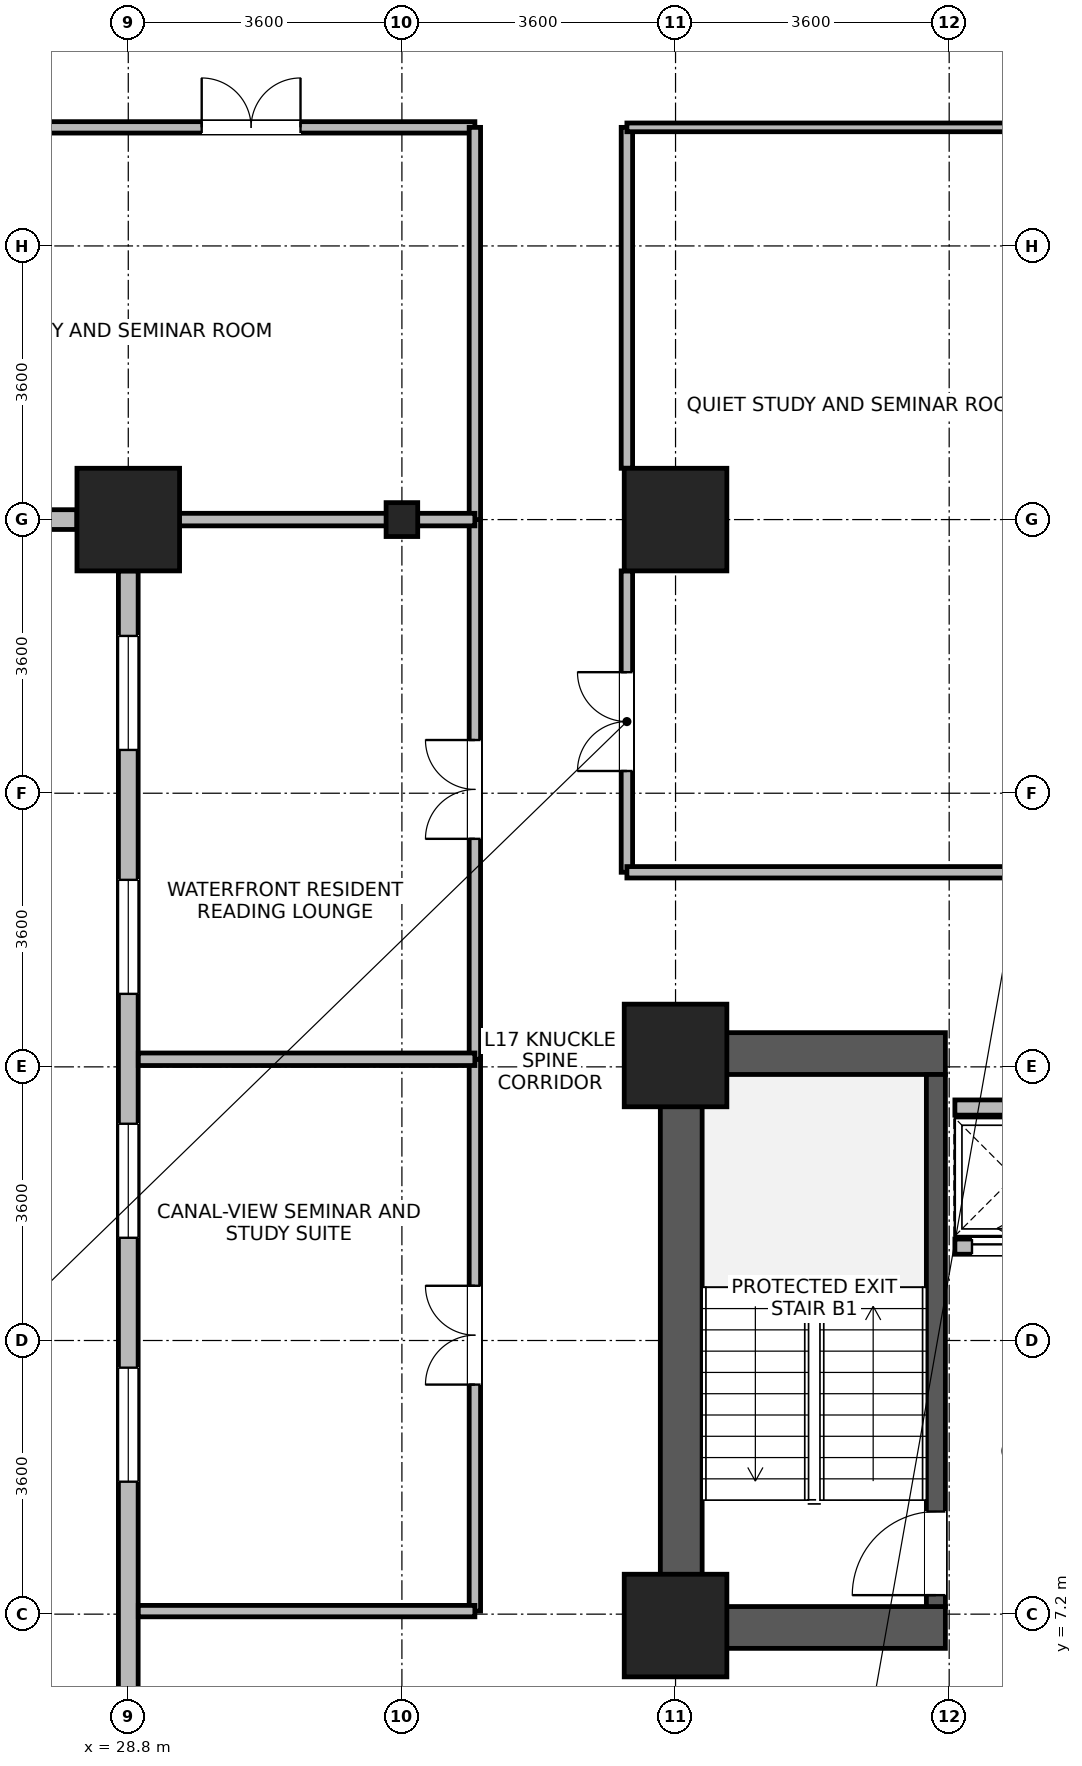
"""IFC4 building model, lengths in metres.
Left out: names, types, materials, properties, quantities, classifications, styles, units other than length and angle.
Written with IfcOpenShell. Run it as: python <this file> out.ifc"""

import sys

from ifc_helpers import new_model, si_unit, direction, frame, frame_2d, origin, origin_2d, place, context, subcontext, project, spatial, rectangle, i_section, extrude, source, transform, mapped, element, fill, save


model = new_model("IFC4")
c1 = context("Model", 3, precision=1e-05, world=origin(), true_north=direction((0.0, 1.0)))
c2 = subcontext(c1, "Body", "Model", "MODEL_VIEW")
j1 = project(units=[si_unit("LENGTHUNIT", "METRE"), si_unit("PLANEANGLEUNIT", "RADIAN")], contexts=[c1])
p1 = place(None, origin())
s1 = spatial("IfcSite", under=j1, at=p1, CompositionType="ELEMENT")
p2 = place(p1, origin())
s2 = spatial("IfcBuilding", under=s1, at=p2, CompositionType="ELEMENT")
p3 = place(p2, frame((0.0, 0.0, 69.7)))
s3 = spatial("IfcBuildingStorey", under=s2, at=p3, CompositionType="ELEMENT", Elevation=69.7)
p4 = place(p3, frame((36.075, 6.75, 0.0), z_axis=(0.0, 0.0, 1.0), x_axis=(0.0, 1.0, 0.0)))
e1 = element("IfcWall", 1, at=p4, inside=s3, PredefinedType="SHEAR", context=c2, shape_type="SweptSolid", body=[
    extrude(rectangle(XDim=8.1, YDim=0.55, at=frame_2d((4.05, 0.0))), origin(), (0.0, 0.0, 1.0), 3.34),
])
for number, where, z_axis, x_axis in (
    (2, (36.35, 7.025, 0.0), (0.0, 0.0, 1.0), (1.0, 0.0, 0.0)),
    (3, (36.35, 14.575, 0.0), (0.0, 0.0, 1.0), (1.0, 0.0, 0.0)),
):
    element("IfcWall", number, at=place(p3, frame(where, z_axis=z_axis, x_axis=x_axis)), inside=s3, PredefinedType="SHEAR", context=c2, shape_type="SweptSolid", body=[
        extrude(rectangle(XDim=3.2, YDim=0.55, at=frame_2d((1.6, 0.0))), origin(), (0.0, 0.0, 1.0), 3.34),
    ])
p5 = place(p3, frame((39.425, 7.3, 0.0), z_axis=(0.0, 0.0, 1.0), x_axis=(0.0, 1.0, 0.0)))
e4 = element("IfcWall", 4, at=p5, inside=s3, PredefinedType="SHEAR", context=c2, shape_type="SweptSolid", body=[
    extrude(rectangle(XDim=7.0, YDim=0.25, at=frame_2d((3.5, 0.0))), origin(), (0.0, 0.0, 1.0), 3.34),
])
p6 = place(p5, frame((0.15, 0.0, 0.0)))
e5 = element("IfcOpeningElement", 5, at=p6, cuts=e4, PredefinedType="OPENING", context=c2, shape_type="SweptSolid", body=[
    extrude(rectangle(XDim=1.1, YDim=2.08, at=frame_2d((0.55, 1.04))), frame((0.0, 0.135, 0.0), z_axis=(0.0, -1.0, 0.0), x_axis=(1.0, 0.0, 0.0)), (0.0, 0.0, 1.0), 0.27),
])
m1 = source(origin(), c2, "Body", "SweptSolid", [
    extrude(rectangle(XDim=1.35, YDim=1.35, at=origin_2d()), origin(), (0.0, 0.0, 1.0), 3.7),
])
for number, where, z_axis, x_axis in (
    (6, (28.8, 21.6, 0.0), (0.0, 0.0, 1.0), (1.0, 0.0, 0.0)),
    (7, (36.0, 21.6, 0.0), (0.0, 0.0, 1.0), (1.0, 0.0, 0.0)),
    (8, (36.0, 7.05, 0.0), (0.0, 0.0, 1.0), (1.0, 0.0, 0.0)),
    (9, (36.0, 14.55, 0.0), (0.0, 0.0, 1.0), (1.0, 0.0, 0.0)),
):
    element("IfcColumn", number, at=place(p3, frame(where, z_axis=z_axis, x_axis=x_axis)), inside=s3, PredefinedType="COLUMN", context=c2, shape_type="MappedRepresentation", body=[
        mapped(m1, transform((0.0, 0.0, 0.0), x_axis=(1.0, 0.0, 0.0), y_axis=(0.0, 1.0, 0.0), z_axis=(0.0, 0.0, 1.0), scale=1.0)),
    ])
m2 = source(origin(), c2, "Body", "SweptSolid", [
    extrude(i_section(OverallWidth=0.416, OverallDepth=0.446, WebThickness=0.029, FlangeThickness=0.04, FilletRadius=0.015, at=origin_2d()), origin(), (0.0, 0.0, 1.0), 3.7),
])
p7 = place(p3, frame((32.4, 21.6, 0.0), z_axis=(0.0, 0.0, 1.0), x_axis=(1.0, 0.0, 0.0)))
e10 = element("IfcColumn", 10, at=p7, inside=s3, PredefinedType="COLUMN", context=c2, shape_type="MappedRepresentation", body=[
    mapped(m2, transform((0.0, 0.0, 0.0), x_axis=(1.0, 0.0, 0.0), y_axis=(0.0, 1.0, 0.0), z_axis=(0.0, 0.0, 1.0), scale=1.0)),
])
p8 = place(p3, frame((28.124, 21.6, 0.0), z_axis=(0.0, 0.0, 1.0), x_axis=(-1.0, 0.0, 0.0)))
e11 = element("IfcWall", 11, at=p8, inside=s3, PredefinedType="STANDARD", context=c2, shape_type="SweptSolid", body=[
    extrude(rectangle(XDim=2.715, YDim=0.26, at=frame_2d((1.357, 0.0))), origin(), (0.0, 0.0, 1.0), 2.82),
])
p9 = place(p8, frame((0.883, 0.0, 0.85)))
e12 = element("IfcOpeningElement", 12, at=p9, cuts=e11, PredefinedType="OPENING", context=c2, shape_type="SweptSolid", body=[
    extrude(rectangle(XDim=0.95, YDim=1.75, at=frame_2d((0.475, 0.875))), frame((0.0, 0.14, 0.0), z_axis=(0.0, -1.0, 0.0), x_axis=(1.0, 0.0, 0.0)), (0.0, 0.0, 1.0), 0.28),
])
p10 = place(p3, frame((28.8, 1.67, 0.0), z_axis=(0.0, 0.0, 1.0), x_axis=(0.0, 1.0, 0.0)))
e13 = element("IfcWall", 13, at=p10, inside=s3, PredefinedType="STANDARD", context=c2, shape_type="SweptSolid", body=[
    extrude(rectangle(XDim=19.254, YDim=0.26, at=frame_2d((9.627, 0.0))), origin(), (0.0, 0.0, 1.0), 3.32),
])
p11 = place(p10, frame((0.854, 0.0, 0.85)))
e14 = element("IfcOpeningElement", 14, at=p11, cuts=e13, PredefinedType="OPENING", context=c2, shape_type="SweptSolid", body=[
    extrude(rectangle(XDim=1.5, YDim=1.85, at=frame_2d((0.75, 0.925))), frame((0.0, 0.14, 0.0), z_axis=(0.0, -1.0, 0.0), x_axis=(1.0, 0.0, 0.0)), (0.0, 0.0, 1.0), 0.28),
])
p12 = place(p10, frame((7.272, 0.0, 0.85)))
e15 = element("IfcOpeningElement", 15, at=p12, cuts=e13, PredefinedType="OPENING", context=c2, shape_type="SweptSolid", body=[
    extrude(rectangle(XDim=1.5, YDim=1.85, at=frame_2d((0.75, 0.925))), frame((0.0, 0.14, 0.0), z_axis=(0.0, -1.0, 0.0), x_axis=(1.0, 0.0, 0.0)), (0.0, 0.0, 1.0), 0.28),
])
p13 = place(p10, frame((10.481, 0.0, 0.85)))
e16 = element("IfcOpeningElement", 16, at=p13, cuts=e13, PredefinedType="OPENING", context=c2, shape_type="SweptSolid", body=[
    extrude(rectangle(XDim=1.5, YDim=1.85, at=frame_2d((0.75, 0.925))), frame((0.0, 0.14, 0.0), z_axis=(0.0, -1.0, 0.0), x_axis=(1.0, 0.0, 0.0)), (0.0, 0.0, 1.0), 0.28),
])
p14 = place(p10, frame((13.69, 0.0, 0.85)))
e17 = element("IfcOpeningElement", 17, at=p14, cuts=e13, PredefinedType="OPENING", context=c2, shape_type="SweptSolid", body=[
    extrude(rectangle(XDim=1.5, YDim=1.85, at=frame_2d((0.75, 0.925))), frame((0.0, 0.14, 0.0), z_axis=(0.0, -1.0, 0.0), x_axis=(1.0, 0.0, 0.0)), (0.0, 0.0, 1.0), 0.28),
])
p15 = place(p10, frame((16.899, 0.0, 0.85)))
e18 = element("IfcOpeningElement", 18, at=p15, cuts=e13, PredefinedType="OPENING", context=c2, shape_type="SweptSolid", body=[
    extrude(rectangle(XDim=1.5, YDim=1.85, at=frame_2d((0.75, 0.925))), frame((0.0, 0.14, 0.0), z_axis=(0.0, -1.0, 0.0), x_axis=(1.0, 0.0, 0.0)), (0.0, 0.0, 1.0), 0.28),
])
p16 = place(p3, frame((39.675, 12.035, 0.0), z_axis=(0.0, 0.0, 1.0), x_axis=(1.0, 0.0, 0.0)))
e19 = element("IfcWall", 19, at=p16, inside=s3, PredefinedType="PARTITIONING", context=c2, shape_type="SweptSolid", body=[
    extrude(rectangle(XDim=1.55, YDim=0.2, at=frame_2d((0.775, 0.0))), origin(), (0.0, 0.0, 1.0), 3.32),
])
p17 = place(p16, frame((0.225, 0.0, 0.0)))
e20 = element("IfcOpeningElement", 20, at=p17, cuts=e19, PredefinedType="OPENING", context=c2, shape_type="SweptSolid", body=[
    extrude(rectangle(XDim=1.1, YDim=2.12, at=frame_2d((0.55, 1.06))), frame((0.0, 0.11, 0.0), z_axis=(0.0, -1.0, 0.0), x_axis=(1.0, 0.0, 0.0)), (0.0, 0.0, 1.0), 0.22),
])
p18 = place(p3, frame((39.675, 13.865, 0.0), z_axis=(0.0, 0.0, 1.0), x_axis=(1.0, 0.0, 0.0)))
e21 = element("IfcWall", 21, at=p18, inside=s3, PredefinedType="PARTITIONING", context=c2, shape_type="SweptSolid", body=[
    extrude(rectangle(XDim=1.55, YDim=0.2, at=frame_2d((0.775, 0.0))), origin(), (0.0, 0.0, 1.0), 3.32),
])
p19 = place(p3, frame((35.36, 16.96, 0.0), z_axis=(0.0, 0.0, 1.0), x_axis=(0.0, 1.0, 0.0)))
e22 = element("IfcWall", 22, at=p19, inside=s3, PredefinedType="PARTITIONING", context=c2, shape_type="SweptSolid", body=[
    extrude(rectangle(XDim=3.965, YDim=0.15, at=frame_2d((1.982, 0.0))), origin(), (0.0, 0.0, 1.0), 3.32),
])
p20 = place(p19, frame((1.333, 0.0, 0.0)))
e23 = element("IfcOpeningElement", 23, at=p20, cuts=e22, PredefinedType="OPENING", context=c2, shape_type="SweptSolid", body=[
    extrude(rectangle(XDim=1.3, YDim=2.12, at=frame_2d((0.65, 1.06))), frame((0.0, 0.085, 0.0), z_axis=(0.0, -1.0, 0.0), x_axis=(1.0, 0.0, 0.0)), (0.0, 0.0, 1.0), 0.17),
])
p21 = place(p3, frame((35.36, 22.275, 0.0), z_axis=(0.0, 0.0, 1.0), x_axis=(0.0, 1.0, 0.0)))
e24 = element("IfcWall", 24, at=p21, inside=s3, PredefinedType="PARTITIONING", context=c2, shape_type="SweptSolid", body=[
    extrude(rectangle(XDim=4.485, YDim=0.15, at=frame_2d((2.243, 0.0))), origin(), (0.0, 0.0, 1.0), 3.32),
])
p22 = place(p3, frame((26.0, 26.76, 0.0), z_axis=(0.0, 0.0, 1.0), x_axis=(1.0, 0.0, 0.0)))
e25 = element("IfcWall", 25, at=p22, inside=s3, PredefinedType="PARTITIONING", context=c2, shape_type="SweptSolid", body=[
    extrude(rectangle(XDim=7.36, YDim=0.15, at=frame_2d((3.68, 0.0))), origin(), (0.0, 0.0, 1.0), 3.32),
])
p23 = place(p22, frame((3.766, 0.0, 0.0)))
e26 = element("IfcOpeningElement", 26, at=p23, cuts=e25, PredefinedType="OPENING", context=c2, shape_type="SweptSolid", body=[
    extrude(rectangle(XDim=1.3, YDim=2.12, at=frame_2d((0.65, 1.06))), frame((0.0, 0.085, 0.0), z_axis=(0.0, -1.0, 0.0), x_axis=(1.0, 0.0, 0.0)), (0.0, 0.0, 1.0), 0.17),
])
p24 = place(p3, frame((33.36, 7.24, 0.0), z_axis=(0.0, 0.0, 1.0), x_axis=(0.0, 1.0, 0.0)))
e27 = element("IfcWall", 27, at=p24, inside=s3, PredefinedType="PARTITIONING", context=c2, shape_type="SweptSolid", body=[
    extrude(rectangle(XDim=7.26, YDim=0.15, at=frame_2d((3.63, 0.0))), origin(), (0.0, 0.0, 1.0), 3.32),
])
p25 = place(p24, frame((2.98, 0.0, 0.0)))
e28 = element("IfcOpeningElement", 28, at=p25, cuts=e27, PredefinedType="OPENING", context=c2, shape_type="SweptSolid", body=[
    extrude(rectangle(XDim=1.3, YDim=2.12, at=frame_2d((0.65, 1.06))), frame((0.0, 0.085, 0.0), z_axis=(0.0, -1.0, 0.0), x_axis=(1.0, 0.0, 0.0)), (0.0, 0.0, 1.0), 0.17),
])
p26 = place(p3, frame((33.36, 14.5, 0.0), z_axis=(0.0, 0.0, 1.0), x_axis=(0.0, 1.0, 0.0)))
e29 = element("IfcWall", 29, at=p26, inside=s3, PredefinedType="PARTITIONING", context=c2, shape_type="SweptSolid", body=[
    extrude(rectangle(XDim=7.1, YDim=0.15, at=frame_2d((3.55, 0.0))), origin(), (0.0, 0.0, 1.0), 3.32),
])
p27 = place(p26, frame((2.9, 0.0, 0.0)))
e30 = element("IfcOpeningElement", 30, at=p27, cuts=e29, PredefinedType="OPENING", context=c2, shape_type="SweptSolid", body=[
    extrude(rectangle(XDim=1.3, YDim=2.12, at=frame_2d((0.65, 1.06))), frame((0.0, 0.085, 0.0), z_axis=(0.0, -1.0, 0.0), x_axis=(1.0, 0.0, 0.0)), (0.0, 0.0, 1.0), 0.17),
])
p28 = place(p3, frame((35.36, 16.96, 0.0), z_axis=(0.0, 0.0, 1.0), x_axis=(1.0, 0.0, 0.0)))
e31 = element("IfcWall", 31, at=p28, inside=s3, PredefinedType="PARTITIONING", context=c2, shape_type="SweptSolid", body=[
    extrude(rectangle(XDim=6.04, YDim=0.15, at=frame_2d((3.02, 0.0))), origin(), (0.0, 0.0, 1.0), 3.32),
])
p29 = place(p3, frame((33.36, 21.6, 0.0), z_axis=(0.0, 0.0, 1.0), x_axis=(0.0, 1.0, 0.0)))
e32 = element("IfcWall", 32, at=p29, inside=s3, PredefinedType="PARTITIONING", context=c2, shape_type="SweptSolid", body=[
    extrude(rectangle(XDim=5.16, YDim=0.15, at=frame_2d((2.58, 0.0))), origin(), (0.0, 0.0, 1.0), 3.32),
])
p30 = place(p3, frame((28.932, 7.24, 0.0), z_axis=(0.0, 0.0, 1.0), x_axis=(1.0, 0.0, 0.0)))
e33 = element("IfcWall", 33, at=p30, inside=s3, PredefinedType="PARTITIONING", context=c2, shape_type="SweptSolid", body=[
    extrude(rectangle(XDim=4.428, YDim=0.15, at=frame_2d((2.214, 0.0))), origin(), (0.0, 0.0, 1.0), 3.32),
])
p31 = place(p3, frame((35.36, 26.76, 0.0), z_axis=(0.0, 0.0, 1.0), x_axis=(1.0, 0.0, 0.0)))
e34 = element("IfcWall", 34, at=p31, inside=s3, PredefinedType="PARTITIONING", context=c2, shape_type="SweptSolid", body=[
    extrude(rectangle(XDim=6.04, YDim=0.115, at=frame_2d((3.02, 0.0))), origin(), (0.0, 0.0, 1.0), 3.32),
])
p32 = place(p3, frame((28.932, 14.5, 0.0), z_axis=(0.0, 0.0, 1.0), x_axis=(1.0, 0.0, 0.0)))
e35 = element("IfcWall", 35, at=p32, inside=s3, PredefinedType="PARTITIONING", context=c2, shape_type="SweptSolid", body=[
    extrude(rectangle(XDim=4.428, YDim=0.165, at=frame_2d((2.214, 0.0))), origin(), (0.0, 0.0, 1.0), 3.32),
])
p33 = place(p3, frame((28.932, 21.6, 0.0), z_axis=(0.0, 0.0, 1.0), x_axis=(1.0, 0.0, 0.0)))
e36 = element("IfcWall", 36, at=p33, inside=s3, PredefinedType="PARTITIONING", context=c2, shape_type="SweptSolid", body=[
    extrude(rectangle(XDim=4.428, YDim=0.165, at=frame_2d((2.214, 0.0))), origin(), (0.0, 0.0, 1.0), 2.82),
])
p34 = place(p12, origin())
e37 = element("IfcWindow", 37, at=p34, inside=s3, PartitioningType="SINGLE_PANEL", PredefinedType="WINDOW", context=c2, shape_type="SweptSolid", body=[
    extrude(rectangle(XDim=1.5, YDim=1.85, at=frame_2d((0.75, 0.925))), frame((0.0, 0.03, 0.0), z_axis=(0.0, -1.0, 0.0), x_axis=(1.0, 0.0, 0.0)), (0.0, 0.0, 1.0), 0.06),
])
fill(e15, e37)
p35 = place(p13, origin())
e38 = element("IfcWindow", 38, at=p35, inside=s3, PartitioningType="SINGLE_PANEL", PredefinedType="WINDOW", context=c2, shape_type="SweptSolid", body=[
    extrude(rectangle(XDim=1.5, YDim=1.85, at=frame_2d((0.75, 0.925))), frame((0.0, 0.03, 0.0), z_axis=(0.0, -1.0, 0.0), x_axis=(1.0, 0.0, 0.0)), (0.0, 0.0, 1.0), 0.06),
])
fill(e16, e38)
p36 = place(p14, origin())
e39 = element("IfcWindow", 39, at=p36, inside=s3, PartitioningType="SINGLE_PANEL", PredefinedType="WINDOW", context=c2, shape_type="SweptSolid", body=[
    extrude(rectangle(XDim=1.5, YDim=1.85, at=frame_2d((0.75, 0.925))), frame((0.0, 0.03, 0.0), z_axis=(0.0, -1.0, 0.0), x_axis=(1.0, 0.0, 0.0)), (0.0, 0.0, 1.0), 0.06),
])
fill(e17, e39)
p37 = place(p15, origin())
e40 = element("IfcWindow", 40, at=p37, inside=s3, PartitioningType="SINGLE_PANEL", PredefinedType="WINDOW", context=c2, shape_type="SweptSolid", body=[
    extrude(rectangle(XDim=1.5, YDim=1.85, at=frame_2d((0.75, 0.925))), frame((0.0, 0.03, 0.0), z_axis=(0.0, -1.0, 0.0), x_axis=(1.0, 0.0, 0.0)), (0.0, 0.0, 1.0), 0.06),
])
fill(e18, e40)
p38 = place(p6, origin())
e41 = element("IfcDoor", 41, at=p38, inside=s3, OperationType="SINGLE_SWING_LEFT", PredefinedType="DOOR", context=c2, shape_type="SweptSolid", body=[
    extrude(rectangle(XDim=1.1, YDim=2.08, at=frame_2d((0.55, 1.04))), frame((0.0, 0.025, 0.0), z_axis=(0.0, -1.0, 0.0), x_axis=(1.0, 0.0, 0.0)), (0.0, 0.0, 1.0), 0.05),
])
fill(e5, e41)
p39 = place(p17, origin())
e42 = element("IfcDoor", 42, at=p39, inside=s3, OperationType="SLIDING_TO_LEFT", PredefinedType="DOOR", context=c2, shape_type="SweptSolid", body=[
    extrude(rectangle(XDim=1.1, YDim=2.12, at=frame_2d((0.55, 1.06))), frame((0.0, 0.025, 0.0), z_axis=(0.0, -1.0, 0.0), x_axis=(1.0, 0.0, 0.0)), (0.0, 0.0, 1.0), 0.05),
])
fill(e20, e42)
p40 = place(p20, origin())
e43 = element("IfcDoor", 43, at=p40, inside=s3, OperationType="DOUBLE_DOOR_SINGLE_SWING", PredefinedType="DOOR", context=c2, shape_type="SweptSolid", body=[
    extrude(rectangle(XDim=1.3, YDim=2.12, at=frame_2d((0.65, 1.06))), frame((0.0, 0.025, 0.0), z_axis=(0.0, -1.0, 0.0), x_axis=(1.0, 0.0, 0.0)), (0.0, 0.0, 1.0), 0.05),
])
fill(e23, e43)
p41 = place(p23, origin())
e44 = element("IfcDoor", 44, at=p41, inside=s3, OperationType="DOUBLE_DOOR_SINGLE_SWING", PredefinedType="DOOR", context=c2, shape_type="SweptSolid", body=[
    extrude(rectangle(XDim=1.3, YDim=2.12, at=frame_2d((0.65, 1.06))), frame((0.0, 0.025, 0.0), z_axis=(0.0, -1.0, 0.0), x_axis=(1.0, 0.0, 0.0)), (0.0, 0.0, 1.0), 0.05),
])
fill(e26, e44)
p42 = place(p25, origin())
e45 = element("IfcDoor", 45, at=p42, inside=s3, OperationType="DOUBLE_DOOR_SINGLE_SWING", PredefinedType="DOOR", context=c2, shape_type="SweptSolid", body=[
    extrude(rectangle(XDim=1.3, YDim=2.12, at=frame_2d((0.65, 1.06))), frame((0.0, 0.025, 0.0), z_axis=(0.0, -1.0, 0.0), x_axis=(1.0, 0.0, 0.0)), (0.0, 0.0, 1.0), 0.05),
])
fill(e28, e45)
p43 = place(p27, origin())
e46 = element("IfcDoor", 46, at=p43, inside=s3, OperationType="DOUBLE_DOOR_SINGLE_SWING", PredefinedType="DOOR", context=c2, shape_type="SweptSolid", body=[
    extrude(rectangle(XDim=1.3, YDim=2.12, at=frame_2d((0.65, 1.06))), frame((0.0, 0.025, 0.0), z_axis=(0.0, -1.0, 0.0), x_axis=(1.0, 0.0, 0.0)), (0.0, 0.0, 1.0), 0.05),
])
fill(e30, e46)
save(model, sys.argv[1])
